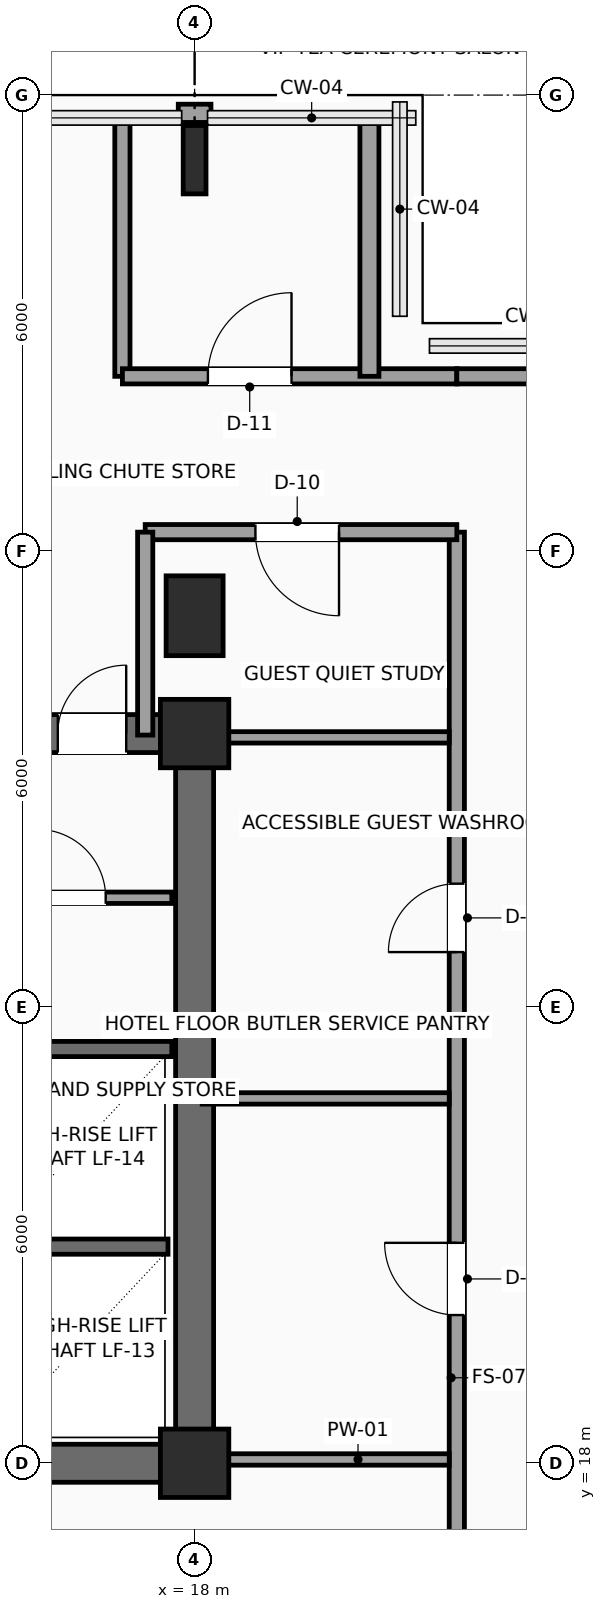
"""IFC4 building model, lengths in metres.
Left out: names, types, materials, properties, quantities, classifications, styles, units other than length and angle.
Written with IfcOpenShell. Run it as: python <this file> out.ifc"""

import sys

from ifc_helpers import new_model, si_unit, direction, frame, frame_2d, origin, origin_2d, place, context, subcontext, project, spatial, rectangle, i_section, extrude, element, fill, save


model = new_model("IFC4")
c1 = context("Model", 3, precision=1e-05, world=origin(), true_north=direction((0.0, 1.0)))
c2 = subcontext(c1, "Body", "Model", "MODEL_VIEW")
j1 = project(units=[si_unit("LENGTHUNIT", "METRE"), si_unit("PLANEANGLEUNIT", "RADIAN")], contexts=[c1])
p1 = place(None, origin())
s1 = spatial("IfcSite", under=j1, at=p1, CompositionType="ELEMENT")
p2 = place(p1, origin())
s2 = spatial("IfcBuilding", under=s1, at=p2, CompositionType="ELEMENT")
p3 = place(p2, frame((0.0, 0.0, 187.95)))
s3 = spatial("IfcBuildingStorey", under=s2, at=p3, CompositionType="ELEMENT", Elevation=187.95)
for number, where, z_axis, x_axis in (
    (1, (18.0, 18.0, 0.0), (0.0, 0.0, 1.0), (1.0, 0.0, 0.0)),
    (2, (18.0, 27.6, 0.0), (0.0, 0.0, 1.0), (1.0, 0.0, 0.0)),
):
    element("IfcColumn", number, at=place(p3, frame(where, z_axis=z_axis, x_axis=x_axis)), inside=s3, PredefinedType="COLUMN", context=c2, shape_type="SweptSolid", body=[
        extrude(rectangle(XDim=0.9, YDim=0.9, at=origin_2d()), origin(), (0.0, 0.0, 1.0), 3.75),
    ])
p4 = place(p3, frame((18.0, 29.15, 0.0), z_axis=(0.0, 0.0, 1.0), x_axis=(1.0, 0.0, 0.0)))
e3 = element("IfcColumn", 3, at=p4, inside=s3, PredefinedType="COLUMN", context=c2, shape_type="SweptSolid", body=[
    extrude(rectangle(XDim=0.75, YDim=1.05, at=origin_2d()), origin(), (0.0, 0.0, 1.0), 3.75),
])
p5 = place(p3, frame((18.0, 35.15, 0.0), z_axis=(0.0, 0.0, 1.0), x_axis=(1.0, 0.0, 0.0)))
e4 = element("IfcColumn", 4, at=p5, inside=s3, PredefinedType="COLUMN", context=c2, shape_type="SweptSolid", body=[
    extrude(i_section(OverallWidth=0.3, OverallDepth=0.9, WebThickness=0.019, FlangeThickness=0.035, FilletRadius=0.03, at=origin_2d()), origin(), (0.0, 0.0, 1.0), 3.75),
])
p6 = place(p3, frame((17.785, 35.76, 0.0), z_axis=(0.0, 0.0, 1.0), x_axis=(1.0, 0.0, 0.0)))
e5 = element("IfcWall", 5, at=p6, inside=s3, PredefinedType="SOLIDWALL", context=c2, shape_type="SweptSolid", body=[
    extrude(rectangle(XDim=0.43, YDim=0.24, at=frame_2d((0.215, 0.0))), origin(), (0.0, 0.0, 1.0), 3.54),
])
p7 = place(p3, frame((6.0, 18.0, 0.0), z_axis=(0.0, 0.0, 1.0), x_axis=(1.0, 0.0, 0.0)))
e6 = element("IfcWall", 6, at=p7, inside=s3, PredefinedType="SHEAR", context=c2, shape_type="SweptSolid", body=[
    extrude(rectangle(XDim=12.0, YDim=0.5, at=frame_2d((6.0, 0.0))), origin(), (0.0, 0.0, 1.0), 3.54),
])
p8 = place(p7, frame((7.15, 0.0, 0.0)))
e7 = element("IfcOpeningElement", 7, at=p8, cuts=e6, PredefinedType="OPENING", context=c2, shape_type="SweptSolid", body=[
    extrude(rectangle(XDim=1.6, YDim=2.3, at=frame_2d((0.8, 1.15))), frame((0.0, 0.26, 0.0), z_axis=(0.0, -1.0, 0.0), x_axis=(1.0, 0.0, 0.0)), (0.0, 0.0, 1.0), 0.52),
])
p9 = place(p3, frame((6.0, 27.6, 0.0), z_axis=(0.0, 0.0, 1.0), x_axis=(1.0, 0.0, 0.0)))
e8 = element("IfcWall", 8, at=p9, inside=s3, PredefinedType="SHEAR", context=c2, shape_type="SweptSolid", body=[
    extrude(rectangle(XDim=12.0, YDim=0.5, at=frame_2d((6.0, 0.0))), origin(), (0.0, 0.0, 1.0), 3.54),
])
p10 = place(p9, frame((10.2, 0.0, 0.0)))
e9 = element("IfcOpeningElement", 9, at=p10, cuts=e8, PredefinedType="OPENING", context=c2, shape_type="SweptSolid", body=[
    extrude(rectangle(XDim=0.9, YDim=2.15, at=frame_2d((0.45, 1.075))), frame((0.0, 0.26, 0.0), z_axis=(0.0, -1.0, 0.0), x_axis=(1.0, 0.0, 0.0)), (0.0, 0.0, 1.0), 0.52),
])
p11 = place(p3, frame((18.0, 18.0, 0.0), z_axis=(0.0, 0.0, 1.0), x_axis=(0.0, 1.0, 0.0)))
e10 = element("IfcWall", 10, at=p11, inside=s3, PredefinedType="SHEAR", context=c2, shape_type="SweptSolid", body=[
    extrude(rectangle(XDim=9.6, YDim=0.5, at=frame_2d((4.8, 0.0))), origin(), (0.0, 0.0, 1.0), 3.54),
])
p12 = place(p3, frame((15.25, 20.85, 0.0), z_axis=(0.0, 0.0, 1.0), x_axis=(1.0, 0.0, 0.0)))
e11 = element("IfcWall", 11, at=p12, inside=s3, PredefinedType="SHEAR", context=c2, shape_type="SweptSolid", body=[
    extrude(rectangle(XDim=2.4, YDim=0.2, at=frame_2d((1.2, 0.0))), origin(), (0.0, 0.0, 1.0), 3.54),
])
p13 = place(p3, frame((15.25, 23.45, 0.0), z_axis=(0.0, 0.0, 1.0), x_axis=(1.0, 0.0, 0.0)))
e12 = element("IfcWall", 12, at=p13, inside=s3, PredefinedType="SHEAR", context=c2, shape_type="SweptSolid", body=[
    extrude(rectangle(XDim=2.45, YDim=0.2, at=frame_2d((1.225, 0.0))), origin(), (0.0, 0.0, 1.0), 3.54),
])
p14 = place(p3, frame((15.28, 25.44, 0.0), z_axis=(0.0, 0.0, 1.0), x_axis=(1.0, 0.0, 0.0)))
e13 = element("IfcWall", 13, at=p14, inside=s3, PredefinedType="PARTITIONING", context=c2, shape_type="SweptSolid", body=[
    extrude(rectangle(XDim=2.42, YDim=0.15, at=frame_2d((1.21, 0.0))), origin(), (0.0, 0.0, 1.0), 3.54),
])
p15 = place(p14, frame((0.65, 0.0, 0.0)))
e14 = element("IfcOpeningElement", 14, at=p15, cuts=e13, PredefinedType="OPENING", context=c2, shape_type="SweptSolid", body=[
    extrude(rectangle(XDim=0.9, YDim=2.15, at=frame_2d((0.45, 1.075))), frame((0.0, 0.085, 0.0), z_axis=(0.0, -1.0, 0.0), x_axis=(1.0, 0.0, 0.0)), (0.0, 0.0, 1.0), 0.17),
])
p16 = place(p3, frame((21.45, 10.55, 0.0), z_axis=(0.0, 0.0, 1.0), x_axis=(0.0, 1.0, 0.0)))
e15 = element("IfcWall", 15, at=p16, inside=s3, PredefinedType="SOLIDWALL", context=c2, shape_type="SweptSolid", body=[
    extrude(rectangle(XDim=19.7, YDim=0.2, at=frame_2d((9.85, 0.0))), origin(), (0.0, 0.0, 1.0), 3.54),
])
p17 = place(p16, frame((9.4, 0.0, 0.0)))
e16 = element("IfcOpeningElement", 16, at=p17, cuts=e15, PredefinedType="OPENING", context=c2, shape_type="SweptSolid", body=[
    extrude(rectangle(XDim=0.95, YDim=2.15, at=frame_2d((0.475, 1.075))), frame((0.0, 0.11, 0.0), z_axis=(0.0, -1.0, 0.0), x_axis=(1.0, 0.0, 0.0)), (0.0, 0.0, 1.0), 0.22),
])
p18 = place(p16, frame((14.175, 0.0, 0.0)))
e17 = element("IfcOpeningElement", 17, at=p18, cuts=e15, PredefinedType="OPENING", context=c2, shape_type="SweptSolid", body=[
    extrude(rectangle(XDim=0.9, YDim=2.1, at=frame_2d((0.45, 1.05))), frame((0.0, 0.11, 0.0), z_axis=(0.0, -1.0, 0.0), x_axis=(1.0, 0.0, 0.0)), (0.0, 0.0, 1.0), 0.22),
])
p19 = place(p3, frame((21.45, 30.25, 0.0), z_axis=(0.0, 0.0, 1.0), x_axis=(-1.0, 0.0, 0.0)))
e18 = element("IfcWall", 18, at=p19, inside=s3, PredefinedType="SOLIDWALL", context=c2, shape_type="SweptSolid", body=[
    extrude(rectangle(XDim=4.1, YDim=0.2, at=frame_2d((2.05, 0.0))), origin(), (0.0, 0.0, 1.0), 3.54),
])
p20 = place(p19, frame((1.55, 0.0, 0.0)))
e19 = element("IfcOpeningElement", 19, at=p20, cuts=e18, PredefinedType="OPENING", context=c2, shape_type="SweptSolid", body=[
    extrude(rectangle(XDim=1.1, YDim=2.25, at=frame_2d((0.55, 1.125))), frame((0.0, 0.11, 0.0), z_axis=(0.0, -1.0, 0.0), x_axis=(1.0, 0.0, 0.0)), (0.0, 0.0, 1.0), 0.22),
])
p21 = place(p3, frame((17.35, 30.25, 0.0), z_axis=(0.0, 0.0, 1.0), x_axis=(0.0, -1.0, 0.0)))
e20 = element("IfcWall", 20, at=p21, inside=s3, PredefinedType="SOLIDWALL", context=c2, shape_type="SweptSolid", body=[
    extrude(rectangle(XDim=2.67, YDim=0.2, at=frame_2d((1.335, 0.0))), origin(), (0.0, 0.0, 1.0), 3.54),
])
p22 = place(p3, frame((17.05, 35.7, 0.0), z_axis=(0.0, 0.0, 1.0), x_axis=(0.0, -1.0, 0.0)))
e21 = element("IfcWall", 21, at=p22, inside=s3, PredefinedType="SOLIDWALL", context=c2, shape_type="SweptSolid", body=[
    extrude(rectangle(XDim=3.4, YDim=0.2, at=frame_2d((1.7, 0.0))), origin(), (0.0, 0.0, 1.0), 3.54),
])
p23 = place(p3, frame((17.05, 32.3, 0.0), z_axis=(0.0, 0.0, 1.0), x_axis=(1.0, 0.0, 0.0)))
e22 = element("IfcWall", 22, at=p23, inside=s3, PredefinedType="SOLIDWALL", context=c2, shape_type="SweptSolid", body=[
    extrude(rectangle(XDim=4.4, YDim=0.2, at=frame_2d((2.2, 0.0))), origin(), (0.0, 0.0, 1.0), 3.132),
])
p24 = place(p23, frame((1.125, 0.0, 0.0)))
e23 = element("IfcOpeningElement", 23, at=p24, cuts=e22, PredefinedType="OPENING", context=c2, shape_type="SweptSolid", body=[
    extrude(rectangle(XDim=1.1, YDim=2.25, at=frame_2d((0.55, 1.125))), frame((0.0, 0.11, 0.0), z_axis=(0.0, -1.0, 0.0), x_axis=(1.0, 0.0, 0.0)), (0.0, 0.0, 1.0), 0.22),
])
p25 = place(p3, frame((21.45, 32.3, 0.0), z_axis=(0.0, 0.0, 1.0), x_axis=(1.0, 0.0, 0.0)))
e24 = element("IfcWall", 24, at=p25, inside=s3, PredefinedType="SOLIDWALL", context=c2, shape_type="SweptSolid", body=[
    extrude(rectangle(XDim=2.25, YDim=0.2, at=frame_2d((1.125, 0.0))), origin(), (0.0, 0.0, 1.0), 3.54),
])
p26 = place(p3, frame((18.1, 18.05, 0.0), z_axis=(0.0, 0.0, 1.0), x_axis=(1.0, 0.0, 0.0)))
e25 = element("IfcWall", 25, at=p26, inside=s3, PredefinedType="PARTITIONING", context=c2, shape_type="SweptSolid", body=[
    extrude(rectangle(XDim=3.25, YDim=0.15, at=frame_2d((1.625, 0.0))), origin(), (0.0, 0.0, 1.0), 3.132),
])
for number, where, z_axis, x_axis in (
    (26, (18.1, 22.8, 0.0), (0.0, 0.0, 1.0), (1.0, 0.0, 0.0)),
    (27, (18.1, 27.55, 0.0), (0.0, 0.0, 1.0), (1.0, 0.0, 0.0)),
):
    element("IfcWall", number, at=place(p3, frame(where, z_axis=z_axis, x_axis=x_axis)), inside=s3, PredefinedType="PARTITIONING", context=c2, shape_type="SweptSolid", body=[
        extrude(rectangle(XDim=3.25, YDim=0.15, at=frame_2d((1.625, 0.0))), origin(), (0.0, 0.0, 1.0), 3.54),
    ])
p27 = place(p3, frame((20.3, 32.3, 0.0), z_axis=(0.0, 0.0, 1.0), x_axis=(0.0, 1.0, 0.0)))
e28 = element("IfcWall", 28, at=p27, inside=s3, PredefinedType="PARTITIONING", context=c2, shape_type="SweptSolid", body=[
    extrude(rectangle(XDim=3.4, YDim=0.25, at=frame_2d((1.7, 0.0))), origin(), (0.0, 0.0, 1.0), 3.54),
])
p28 = place(p10, origin())
e29 = element("IfcDoor", 29, at=p28, inside=s3, OperationType="SINGLE_SWING_RIGHT", PredefinedType="DOOR", context=c2, shape_type="SweptSolid", body=[
    extrude(rectangle(XDim=0.9, YDim=2.15, at=frame_2d((0.45, 1.075))), frame((0.0, 0.025, 0.0), z_axis=(0.0, -1.0, 0.0), x_axis=(1.0, 0.0, 0.0)), (0.0, 0.0, 1.0), 0.05),
])
fill(e9, e29)
p29 = place(p15, origin())
e30 = element("IfcDoor", 30, at=p29, inside=s3, OperationType="SINGLE_SWING_LEFT", PredefinedType="DOOR", context=c2, shape_type="SweptSolid", body=[
    extrude(rectangle(XDim=0.9, YDim=2.15, at=frame_2d((0.45, 1.075))), frame((0.0, 0.025, 0.0), z_axis=(0.0, -1.0, 0.0), x_axis=(1.0, 0.0, 0.0)), (0.0, 0.0, 1.0), 0.05),
])
fill(e14, e30)
p30 = place(p17, origin())
e31 = element("IfcDoor", 31, at=p30, inside=s3, OperationType="SINGLE_SWING_RIGHT", PredefinedType="DOOR", context=c2, shape_type="SweptSolid", body=[
    extrude(rectangle(XDim=0.95, YDim=2.15, at=frame_2d((0.475, 1.075))), frame((0.0, 0.025, 0.0), z_axis=(0.0, -1.0, 0.0), x_axis=(1.0, 0.0, 0.0)), (0.0, 0.0, 1.0), 0.05),
])
fill(e16, e31)
p31 = place(p18, origin())
e32 = element("IfcDoor", 32, at=p31, inside=s3, OperationType="SINGLE_SWING_LEFT", PredefinedType="DOOR", context=c2, shape_type="SweptSolid", body=[
    extrude(rectangle(XDim=0.9, YDim=2.1, at=frame_2d((0.45, 1.05))), frame((0.0, 0.025, 0.0), z_axis=(0.0, -1.0, 0.0), x_axis=(1.0, 0.0, 0.0)), (0.0, 0.0, 1.0), 0.05),
])
fill(e17, e32)
p32 = place(p20, origin())
e33 = element("IfcDoor", 33, at=p32, inside=s3, OperationType="SINGLE_SWING_LEFT", PredefinedType="DOOR", context=c2, shape_type="SweptSolid", body=[
    extrude(rectangle(XDim=1.1, YDim=2.25, at=frame_2d((0.55, 1.125))), frame((0.0, 0.025, 0.0), z_axis=(0.0, -1.0, 0.0), x_axis=(1.0, 0.0, 0.0)), (0.0, 0.0, 1.0), 0.05),
])
fill(e19, e33)
p33 = place(p24, origin())
e34 = element("IfcDoor", 34, at=p33, inside=s3, OperationType="SINGLE_SWING_RIGHT", PredefinedType="DOOR", context=c2, shape_type="SweptSolid", body=[
    extrude(rectangle(XDim=1.1, YDim=2.25, at=frame_2d((0.55, 1.125))), frame((0.0, 0.025, 0.0), z_axis=(0.0, -1.0, 0.0), x_axis=(1.0, 0.0, 0.0)), (0.0, 0.0, 1.0), 0.05),
])
fill(e23, e34)
save(model, sys.argv[1])
